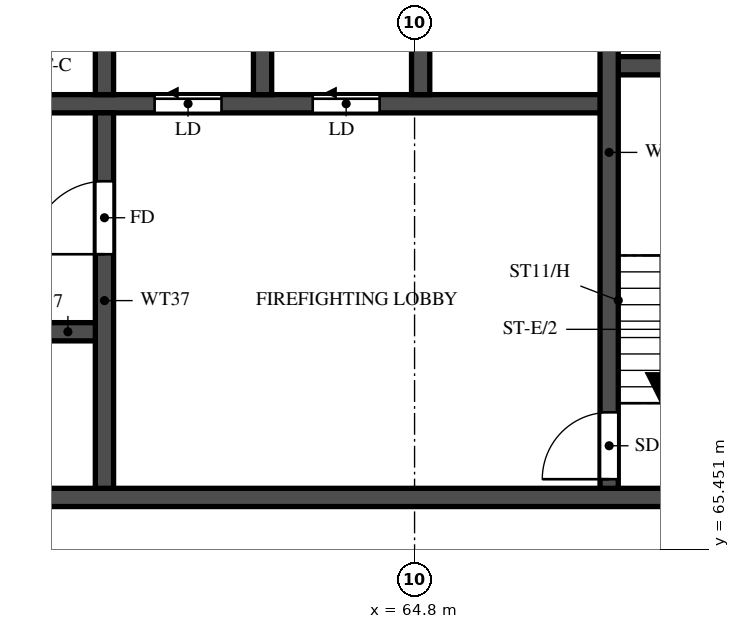
"""IFC4 building model, lengths in metres.
Left out: names, types, materials, properties, quantities, classifications, styles, units other than length and angle.
Written with IfcOpenShell. Run it as: python <this file> out.ifc"""

import sys

from ifc_helpers import new_model, si_unit, direction, frame, frame_2d, origin, place, context, subcontext, project, spatial, rectangle, extrude, element, fill, save


model = new_model("IFC4")
c1 = context("Model", 3, precision=1e-05, world=origin(), true_north=direction((0.0, 1.0)))
c2 = subcontext(c1, "Body", "Model", "MODEL_VIEW")
j1 = project(units=[si_unit("LENGTHUNIT", "METRE"), si_unit("PLANEANGLEUNIT", "RADIAN")], contexts=[c1])
p1 = place(None, origin())
s1 = spatial("IfcSite", under=j1, at=p1, CompositionType="ELEMENT")
p2 = place(p1, origin())
s2 = spatial("IfcBuilding", under=s1, at=p2, CompositionType="ELEMENT")
p3 = place(p2, frame((0.0, 0.0, 218.5)))
s3 = spatial("IfcBuildingStorey", under=s2, at=p3, CompositionType="ELEMENT", Elevation=218.5)
p4 = place(p3, frame((29.2, 66.3, 0.0), z_axis=(0.0, 0.0, 1.0), x_axis=(1.0, 0.0, 0.0)))
e1 = element("IfcWall", 1, at=p4, inside=s3, PredefinedType="SHEAR", context=c2, shape_type="SweptSolid", body=[
    extrude(rectangle(XDim=42.4, YDim=0.3, at=frame_2d((21.2, 0.0))), origin(), (0.0, 0.0, 1.0), 3.22),
])
p5 = place(p4, frame((1.425, 0.0, 0.0)))
e2 = element("IfcOpeningElement", 2, at=p5, cuts=e1, PredefinedType="OPENING", context=c2, shape_type="SweptSolid", body=[
    extrude(rectangle(XDim=1.1, YDim=2.1, at=frame_2d((0.55, 1.05))), frame((0.0, 0.16, 0.0), z_axis=(0.0, -1.0, 0.0), x_axis=(1.0, 0.0, 0.0)), (0.0, 0.0, 1.0), 0.32),
])
p6 = place(p4, frame((4.2, 0.0, 0.0)))
e3 = element("IfcOpeningElement", 3, at=p6, cuts=e1, PredefinedType="OPENING", context=c2, shape_type="SweptSolid", body=[
    extrude(rectangle(XDim=1.8, YDim=2.1, at=frame_2d((0.9, 1.05))), frame((0.0, 0.16, 0.0), z_axis=(0.0, -1.0, 0.0), x_axis=(1.0, 0.0, 0.0)), (0.0, 0.0, 1.0), 0.32),
])
p7 = place(p3, frame((35.65, 69.025, 0.0), z_axis=(0.0, 0.0, 1.0), x_axis=(1.0, 0.0, 0.0)))
e4 = element("IfcWall", 4, at=p7, inside=s3, PredefinedType="SHEAR", context=c2, shape_type="SweptSolid", body=[
    extrude(rectangle(XDim=24.05, YDim=0.3, at=frame_2d((12.025, 0.0))), origin(), (0.0, 0.0, 1.0), 3.22),
])
p8 = place(p7, frame((0.975, 0.0, 0.0)))
e5 = element("IfcOpeningElement", 5, at=p8, cuts=e4, PredefinedType="OPENING", context=c2, shape_type="SweptSolid", body=[
    extrude(rectangle(XDim=1.1, YDim=2.1, at=frame_2d((0.55, 1.05))), frame((0.0, 0.16, 0.0), z_axis=(0.0, -1.0, 0.0), x_axis=(1.0, 0.0, 0.0)), (0.0, 0.0, 1.0), 0.32),
])
p9 = place(p7, frame((3.725, 0.0, 0.0)))
e6 = element("IfcOpeningElement", 6, at=p9, cuts=e4, PredefinedType="OPENING", context=c2, shape_type="SweptSolid", body=[
    extrude(rectangle(XDim=1.1, YDim=2.1, at=frame_2d((0.55, 1.05))), frame((0.0, 0.16, 0.0), z_axis=(0.0, -1.0, 0.0), x_axis=(1.0, 0.0, 0.0)), (0.0, 0.0, 1.0), 0.32),
])
p10 = place(p7, frame((6.475, 0.0, 0.0)))
e7 = element("IfcOpeningElement", 7, at=p10, cuts=e4, PredefinedType="OPENING", context=c2, shape_type="SweptSolid", body=[
    extrude(rectangle(XDim=1.1, YDim=2.1, at=frame_2d((0.55, 1.05))), frame((0.0, 0.16, 0.0), z_axis=(0.0, -1.0, 0.0), x_axis=(1.0, 0.0, 0.0)), (0.0, 0.0, 1.0), 0.32),
])
p11 = place(p7, frame((9.225, 0.0, 0.0)))
e8 = element("IfcOpeningElement", 8, at=p11, cuts=e4, PredefinedType="OPENING", context=c2, shape_type="SweptSolid", body=[
    extrude(rectangle(XDim=1.1, YDim=2.1, at=frame_2d((0.55, 1.05))), frame((0.0, 0.16, 0.0), z_axis=(0.0, -1.0, 0.0), x_axis=(1.0, 0.0, 0.0)), (0.0, 0.0, 1.0), 0.32),
])
p12 = place(p7, frame((11.975, 0.0, 0.0)))
e9 = element("IfcOpeningElement", 9, at=p12, cuts=e4, PredefinedType="OPENING", context=c2, shape_type="SweptSolid", body=[
    extrude(rectangle(XDim=1.1, YDim=2.1, at=frame_2d((0.55, 1.05))), frame((0.0, 0.16, 0.0), z_axis=(0.0, -1.0, 0.0), x_axis=(1.0, 0.0, 0.0)), (0.0, 0.0, 1.0), 0.32),
])
p13 = place(p7, frame((14.725, 0.0, 0.0)))
e10 = element("IfcOpeningElement", 10, at=p13, cuts=e4, PredefinedType="OPENING", context=c2, shape_type="SweptSolid", body=[
    extrude(rectangle(XDim=1.1, YDim=2.1, at=frame_2d((0.55, 1.05))), frame((0.0, 0.16, 0.0), z_axis=(0.0, -1.0, 0.0), x_axis=(1.0, 0.0, 0.0)), (0.0, 0.0, 1.0), 0.32),
])
p14 = place(p7, frame((17.6, 0.0, 0.0)))
e11 = element("IfcOpeningElement", 11, at=p14, cuts=e4, PredefinedType="OPENING", context=c2, shape_type="SweptSolid", body=[
    extrude(rectangle(XDim=1.1, YDim=2.1, at=frame_2d((0.55, 1.05))), frame((0.0, 0.16, 0.0), z_axis=(0.0, -1.0, 0.0), x_axis=(1.0, 0.0, 0.0)), (0.0, 0.0, 1.0), 0.32),
])
p15 = place(p7, frame((20.6, 0.0, 0.0)))
e12 = element("IfcOpeningElement", 12, at=p15, cuts=e4, PredefinedType="OPENING", context=c2, shape_type="SweptSolid", body=[
    extrude(rectangle(XDim=1.1, YDim=2.1, at=frame_2d((0.55, 1.05))), frame((0.0, 0.16, 0.0), z_axis=(0.0, -1.0, 0.0), x_axis=(1.0, 0.0, 0.0)), (0.0, 0.0, 1.0), 0.32),
])
p16 = place(p3, frame((32.8, 72.775, 0.0), z_axis=(0.0, 0.0, 1.0), x_axis=(1.0, 0.0, 0.0)))
e13 = element("IfcWall", 13, at=p16, inside=s3, PredefinedType="SHEAR", context=c2, shape_type="SweptSolid", body=[
    extrude(rectangle(XDim=35.2, YDim=0.3, at=frame_2d((17.6, 0.0))), origin(), (0.0, 0.0, 1.0), 3.22),
])
p17 = place(p16, frame((19.8, 0.0, 0.0)))
e14 = element("IfcOpeningElement", 14, at=p17, cuts=e13, PredefinedType="OPENING", context=c2, shape_type="SweptSolid", body=[
    extrude(rectangle(XDim=1.1, YDim=2.1, at=frame_2d((0.55, 1.05))), frame((0.0, 0.16, 0.0), z_axis=(0.0, -1.0, 0.0), x_axis=(1.0, 0.0, 0.0)), (0.0, 0.0, 1.0), 0.32),
])
p18 = place(p16, frame((27.725, 0.0, 0.0)))
e15 = element("IfcOpeningElement", 15, at=p18, cuts=e13, PredefinedType="OPENING", context=c2, shape_type="SweptSolid", body=[
    extrude(rectangle(XDim=1.1, YDim=2.1, at=frame_2d((0.55, 1.05))), frame((0.0, 0.16, 0.0), z_axis=(0.0, -1.0, 0.0), x_axis=(1.0, 0.0, 0.0)), (0.0, 0.0, 1.0), 0.32),
])
p19 = place(p16, frame((30.325, 0.0, 0.0)))
e16 = element("IfcOpeningElement", 16, at=p19, cuts=e13, PredefinedType="OPENING", context=c2, shape_type="SweptSolid", body=[
    extrude(rectangle(XDim=1.1, YDim=2.1, at=frame_2d((0.55, 1.05))), frame((0.0, 0.16, 0.0), z_axis=(0.0, -1.0, 0.0), x_axis=(1.0, 0.0, 0.0)), (0.0, 0.0, 1.0), 0.32),
])
p20 = place(p16, frame((3.825, 0.0, 0.0)))
e17 = element("IfcOpeningElement", 17, at=p20, cuts=e13, PredefinedType="OPENING", context=c2, shape_type="SweptSolid", body=[
    extrude(rectangle(XDim=1.1, YDim=2.1, at=frame_2d((0.55, 1.05))), frame((0.0, 0.16, 0.0), z_axis=(0.0, -1.0, 0.0), x_axis=(1.0, 0.0, 0.0)), (0.0, 0.0, 1.0), 0.32),
])
p21 = place(p16, frame((6.575, 0.0, 0.0)))
e18 = element("IfcOpeningElement", 18, at=p21, cuts=e13, PredefinedType="OPENING", context=c2, shape_type="SweptSolid", body=[
    extrude(rectangle(XDim=1.1, YDim=2.1, at=frame_2d((0.55, 1.05))), frame((0.0, 0.16, 0.0), z_axis=(0.0, -1.0, 0.0), x_axis=(1.0, 0.0, 0.0)), (0.0, 0.0, 1.0), 0.32),
])
p22 = place(p16, frame((9.325, 0.0, 0.0)))
e19 = element("IfcOpeningElement", 19, at=p22, cuts=e13, PredefinedType="OPENING", context=c2, shape_type="SweptSolid", body=[
    extrude(rectangle(XDim=1.1, YDim=2.1, at=frame_2d((0.55, 1.05))), frame((0.0, 0.16, 0.0), z_axis=(0.0, -1.0, 0.0), x_axis=(1.0, 0.0, 0.0)), (0.0, 0.0, 1.0), 0.32),
])
p23 = place(p16, frame((12.075, 0.0, 0.0)))
e20 = element("IfcOpeningElement", 20, at=p23, cuts=e13, PredefinedType="OPENING", context=c2, shape_type="SweptSolid", body=[
    extrude(rectangle(XDim=1.1, YDim=2.1, at=frame_2d((0.55, 1.05))), frame((0.0, 0.16, 0.0), z_axis=(0.0, -1.0, 0.0), x_axis=(1.0, 0.0, 0.0)), (0.0, 0.0, 1.0), 0.32),
])
p24 = place(p16, frame((14.825, 0.0, 0.0)))
e21 = element("IfcOpeningElement", 21, at=p24, cuts=e13, PredefinedType="OPENING", context=c2, shape_type="SweptSolid", body=[
    extrude(rectangle(XDim=1.1, YDim=2.1, at=frame_2d((0.55, 1.05))), frame((0.0, 0.16, 0.0), z_axis=(0.0, -1.0, 0.0), x_axis=(1.0, 0.0, 0.0)), (0.0, 0.0, 1.0), 0.32),
])
p25 = place(p16, frame((17.575, 0.0, 0.0)))
e22 = element("IfcOpeningElement", 22, at=p25, cuts=e13, PredefinedType="OPENING", context=c2, shape_type="SweptSolid", body=[
    extrude(rectangle(XDim=1.1, YDim=2.1, at=frame_2d((0.55, 1.05))), frame((0.0, 0.16, 0.0), z_axis=(0.0, -1.0, 0.0), x_axis=(1.0, 0.0, 0.0)), (0.0, 0.0, 1.0), 0.32),
])
p26 = place(p16, frame((0.95, 0.0, 0.0)))
e23 = element("IfcOpeningElement", 23, at=p26, cuts=e13, PredefinedType="OPENING", context=c2, shape_type="SweptSolid", body=[
    extrude(rectangle(XDim=1.1, YDim=2.1, at=frame_2d((0.55, 1.05))), frame((0.0, 0.16, 0.0), z_axis=(0.0, -1.0, 0.0), x_axis=(1.0, 0.0, 0.0)), (0.0, 0.0, 1.0), 0.32),
])
p27 = place(p3, frame((68.0, 73.4, 0.0), z_axis=(0.0, 0.0, 1.0), x_axis=(1.0, 0.0, 0.0)))
e24 = element("IfcWall", 24, at=p27, inside=s3, PredefinedType="SHEAR", context=c2, shape_type="SweptSolid", body=[
    extrude(rectangle(XDim=3.1, YDim=0.3, at=frame_2d((1.55, 0.0))), origin(), (0.0, 0.0, 1.0), 3.22),
])
p28 = place(p3, frame((68.0, 66.45, 0.0), z_axis=(0.0, 0.0, 1.0), x_axis=(0.0, 1.0, 0.0)))
e25 = element("IfcWall", 25, at=p28, inside=s3, PredefinedType="SHEAR", context=c2, shape_type="SweptSolid", body=[
    extrude(rectangle(XDim=11.05, YDim=0.3, at=frame_2d((5.525, 0.0))), origin(), (0.0, 0.0, 1.0), 3.22),
])
p29 = place(p28, frame((0.15, 0.0, 0.0)))
e26 = element("IfcOpeningElement", 26, at=p29, cuts=e25, PredefinedType="OPENING", context=c2, shape_type="SweptSolid", body=[
    extrude(rectangle(XDim=1.1, YDim=2.1, at=frame_2d((0.55, 1.05))), frame((0.0, 0.16, 0.0), z_axis=(0.0, -1.0, 0.0), x_axis=(1.0, 0.0, 0.0)), (0.0, 0.0, 1.0), 0.32),
])
p30 = place(p3, frame((59.7, 66.45, 0.0), z_axis=(0.0, 0.0, 1.0), x_axis=(0.0, 1.0, 0.0)))
e27 = element("IfcWall", 27, at=p30, inside=s3, PredefinedType="SHEAR", context=c2, shape_type="SweptSolid", body=[
    extrude(rectangle(XDim=6.175, YDim=0.3, at=frame_2d((3.087, 0.0))), origin(), (0.0, 0.0, 1.0), 3.22),
])
p31 = place(p30, frame((3.85, 0.0, 0.0)))
e28 = element("IfcOpeningElement", 28, at=p31, cuts=e27, PredefinedType="OPENING", context=c2, shape_type="SweptSolid", body=[
    extrude(rectangle(XDim=1.2, YDim=2.1, at=frame_2d((0.6, 1.05))), frame((0.0, 0.16, 0.0), z_axis=(0.0, -1.0, 0.0), x_axis=(1.0, 0.0, 0.0)), (0.0, 0.0, 1.0), 0.32),
])
for number, where, z_axis, x_axis in (
    (29, (59.7, 72.925, 0.0), (0.0, 0.0, 1.0), (0.0, 1.0, 0.0)),
    (30, (62.3, 72.925, 0.0), (0.0, 0.0, 1.0), (0.0, 1.0, 0.0)),
    (31, (64.9, 72.925, 0.0), (0.0, 0.0, 1.0), (0.0, 1.0, 0.0)),
):
    element("IfcWall", number, at=place(p3, frame(where, z_axis=z_axis, x_axis=x_axis)), inside=s3, PredefinedType="SHEAR", context=c2, shape_type="SweptSolid", body=[
        extrude(rectangle(XDim=2.95, YDim=0.3, at=frame_2d((1.475, 0.0))), origin(), (0.0, 0.0, 1.0), 3.22),
    ])
p32 = place(p29, origin())
e32 = element("IfcDoor", 32, at=p32, inside=s3, OperationType="SINGLE_SWING_RIGHT", PredefinedType="DOOR", context=c2, shape_type="SweptSolid", body=[
    extrude(rectangle(XDim=1.1, YDim=2.1, at=frame_2d((0.55, 1.05))), frame((0.0, 0.025, 0.0), z_axis=(0.0, -1.0, 0.0), x_axis=(1.0, 0.0, 0.0)), (0.0, 0.0, 1.0), 0.05),
])
fill(e26, e32)
p33 = place(p31, origin())
e33 = element("IfcDoor", 33, at=p33, inside=s3, OperationType="SINGLE_SWING_LEFT", PredefinedType="DOOR", context=c2, shape_type="SweptSolid", body=[
    extrude(rectangle(XDim=1.2, YDim=2.1, at=frame_2d((0.6, 1.05))), frame((0.0, 0.025, 0.0), z_axis=(0.0, -1.0, 0.0), x_axis=(1.0, 0.0, 0.0)), (0.0, 0.0, 1.0), 0.05),
])
fill(e28, e33)
p34 = place(p18, origin())
e34 = element("IfcDoor", 34, at=p34, inside=s3, OperationType="SLIDING_TO_LEFT", PredefinedType="DOOR", context=c2, shape_type="SweptSolid", body=[
    extrude(rectangle(XDim=1.1, YDim=2.1, at=frame_2d((0.55, 1.05))), frame((0.0, 0.025, 0.0), z_axis=(0.0, -1.0, 0.0), x_axis=(1.0, 0.0, 0.0)), (0.0, 0.0, 1.0), 0.05),
])
fill(e15, e34)
p35 = place(p19, origin())
e35 = element("IfcDoor", 35, at=p35, inside=s3, OperationType="SLIDING_TO_LEFT", PredefinedType="DOOR", context=c2, shape_type="SweptSolid", body=[
    extrude(rectangle(XDim=1.1, YDim=2.1, at=frame_2d((0.55, 1.05))), frame((0.0, 0.025, 0.0), z_axis=(0.0, -1.0, 0.0), x_axis=(1.0, 0.0, 0.0)), (0.0, 0.0, 1.0), 0.05),
])
fill(e16, e35)
save(model, sys.argv[1])
